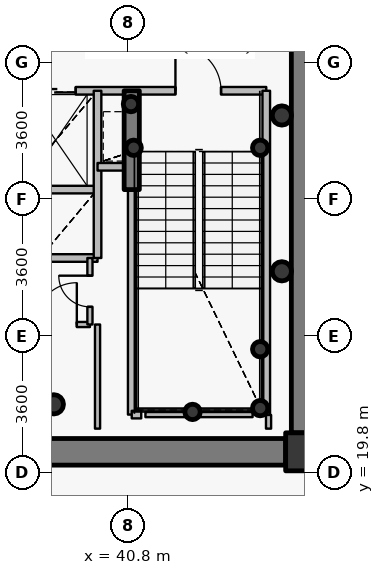
"""IFC4 building model, lengths in metres.
Left out: names, types, materials, properties, quantities, classifications, styles, units other than length and angle.
Written with IfcOpenShell. Run it as: python <this file> out.ifc"""

import sys

from ifc_helpers import new_model, si_unit, direction, frame, frame_2d, origin, origin_2d, place, context, subcontext, project, spatial, rectangle, hollow_circle, extrude, source, transform, mapped, element, fill, save


model = new_model("IFC4")
c1 = context("Model", 3, precision=1e-05, world=origin(), true_north=direction((0.0, 1.0)))
c2 = subcontext(c1, "Body", "Model", "MODEL_VIEW")
j1 = project(units=[si_unit("LENGTHUNIT", "METRE"), si_unit("PLANEANGLEUNIT", "RADIAN")], contexts=[c1])
p1 = place(None, origin())
s1 = spatial("IfcSite", under=j1, at=p1, CompositionType="ELEMENT")
p2 = place(p1, origin())
s2 = spatial("IfcBuilding", under=s1, at=p2, CompositionType="ELEMENT")
p3 = place(p2, frame((0.0, 0.0, 214.05)))
s3 = spatial("IfcBuildingStorey", under=s2, at=p3, CompositionType="ELEMENT", Elevation=214.05)
p4 = place(p3, frame((45.45, 20.35, 0.0), z_axis=(0.0, 0.0, 1.0), x_axis=(1.0, 0.0, 0.0)))
e1 = element("IfcColumn", 1, at=p4, inside=s3, PredefinedType="COLUMN", context=c2, shape_type="SweptSolid", body=[
    extrude(rectangle(XDim=1.0, YDim=1.0, at=origin_2d()), origin(), (0.0, 0.0, 1.0), 3.75),
])
p5 = place(p3, frame((38.85, 21.6, 0.0), z_axis=(0.0, 0.0, 1.0), x_axis=(1.0, 0.0, 0.0)))
e2 = element("IfcColumn", 2, at=p5, inside=s3, PredefinedType="COLUMN", context=c2, shape_type="SweptSolid", body=[
    extrude(hollow_circle(Radius=0.254, WallThickness=0.02, at=origin_2d()), origin(), (0.0, 0.0, 1.0), 3.75),
])
for number, where, z_axis, x_axis in (
    (3, (44.28, 21.5, 0.0), (0.0, 0.0, 1.0), (1.0, 0.0, 0.0)),
    (4, (44.28, 23.05, 0.0), (0.0, 0.0, 1.0), (1.0, 0.0, 0.0)),
    (5, (42.5, 21.4, 0.0), (0.0, 0.0, 1.0), (1.0, 0.0, 0.0)),
    (6, (40.95, 28.35, 0.0), (0.0, 0.0, 1.0), (1.0, 0.0, 0.0)),
    (7, (44.28, 28.35, 0.0), (0.0, 0.0, 1.0), (1.0, 0.0, 0.0)),
    (8, (40.88, 29.5, 0.0), (0.0, 0.0, 1.0), (1.0, 0.0, 0.0)),
):
    element("IfcColumn", number, at=place(p3, frame(where, z_axis=z_axis, x_axis=x_axis)), inside=s3, PredefinedType="COLUMN", context=c2, shape_type="SweptSolid", body=[
        extrude(hollow_circle(Radius=0.203, WallThickness=0.016, at=origin_2d()), origin(), (0.0, 0.0, 1.0), 3.75),
    ])
p6 = place(p3, frame((45.45, 33.15, 0.0), z_axis=(0.0, 0.0, 1.0), x_axis=(0.0, -1.0, 0.0)))
e9 = element("IfcWall", 9, at=p6, inside=s3, PredefinedType="SHEAR", context=c2, shape_type="SweptSolid", body=[
    extrude(rectangle(XDim=12.3, YDim=0.7, at=frame_2d((6.15, 0.0))), origin(), (0.0, 0.0, 1.0), 3.05),
])
p7 = place(p3, frame((44.95, 20.35, 0.0), z_axis=(0.0, 0.0, 1.0), x_axis=(-1.0, 0.0, 0.0)))
e10 = element("IfcWall", 10, at=p7, inside=s3, PredefinedType="SHEAR", context=c2, shape_type="SweptSolid", body=[
    extrude(rectangle(XDim=17.9, YDim=0.7, at=frame_2d((8.95, 0.0))), origin(), (0.0, 0.0, 1.0), 3.05),
])
p8 = place(p7, frame((9.7, 0.0, 0.0)))
e11 = element("IfcOpeningElement", 11, at=p8, cuts=e10, PredefinedType="OPENING", context=c2, shape_type="SweptSolid", body=[
    extrude(rectangle(XDim=1.15, YDim=2.15, at=origin_2d()), frame((0.575, 0.36, 1.075), z_axis=(0.0, -1.0, 0.0), x_axis=(1.0, 0.0, 0.0)), (0.0, 0.0, 1.0), 0.72),
])
p9 = place(p3, frame((40.9, 27.25, 0.0), z_axis=(0.0, 0.0, 1.0), x_axis=(0.0, 1.0, 0.0)))
e12 = element("IfcWall", 12, at=p9, inside=s3, PredefinedType="SHEAR", context=c2, shape_type="SweptSolid", body=[
    extrude(rectangle(XDim=2.6, YDim=0.4, at=frame_2d((1.3, 0.0))), origin(), (0.0, 0.0, 1.0), 3.1),
])
for number, where, z_axis, x_axis in (
    (13, (44.85, 25.1, 0.0), (0.0, 0.0, 1.0), (1.0, 0.0, 0.0)),
    (14, (44.85, 29.2, 0.0), (0.0, 0.0, 1.0), (1.0, 0.0, 0.0)),
):
    element("IfcColumn", number, at=place(p3, frame(where, z_axis=z_axis, x_axis=x_axis)), inside=s3, PredefinedType="COLUMN", context=c2, shape_type="SweptSolid", body=[
        extrude(hollow_circle(Radius=0.254, WallThickness=0.02, at=origin_2d()), origin(), (0.0, 0.0, 1.0), 3.75),
    ])
p10 = place(p3, frame((35.05, 27.25, 0.0), z_axis=(0.0, 0.0, 1.0), x_axis=(1.0, 0.0, 0.0)))
e15 = element("IfcWall", 15, at=p10, inside=s3, PredefinedType="PARTITIONING", context=c2, shape_type="SweptSolid", body=[
    extrude(rectangle(XDim=4.95, YDim=0.2, at=frame_2d((2.475, 0.0))), origin(), (0.0, 0.0, 1.0), 3.085),
])
p11 = place(p3, frame((35.45, 23.7, 0.0), z_axis=(0.0, 0.0, 1.0), x_axis=(1.0, 0.0, 0.0)))
e16 = element("IfcWall", 16, at=p11, inside=s3, PredefinedType="PARTITIONING", context=c2, shape_type="SweptSolid", body=[
    extrude(rectangle(XDim=4.35, YDim=0.135, at=frame_2d((2.175, 0.0))), origin(), (0.0, 0.0, 1.0), 3.085),
])
p12 = place(p11, frame((2.905, 0.0, 0.0)))
e17 = element("IfcOpeningElement", 17, at=p12, cuts=e16, PredefinedType="OPENING", context=c2, shape_type="SweptSolid", body=[
    extrude(rectangle(XDim=1.1, YDim=2.15, at=origin_2d()), frame((0.55, 0.078, 1.075), z_axis=(0.0, -1.0, 0.0), x_axis=(1.0, 0.0, 0.0)), (0.0, 0.0, 1.0), 0.155),
])
p13 = place(p3, frame((35.45, 25.45, 0.0), z_axis=(0.0, 0.0, 1.0), x_axis=(1.0, 0.0, 0.0)))
e18 = element("IfcWall", 18, at=p13, inside=s3, PredefinedType="PARTITIONING", context=c2, shape_type="SweptSolid", body=[
    extrude(rectangle(XDim=4.55, YDim=0.2, at=frame_2d((2.275, 0.0))), origin(), (0.0, 0.0, 1.0), 3.085),
])
p14 = place(p3, frame((35.95, 29.85, 0.0), z_axis=(0.0, 0.0, 1.0), x_axis=(1.0, 0.0, 0.0)))
e19 = element("IfcWall", 19, at=p14, inside=s3, PredefinedType="PARTITIONING", context=c2, shape_type="SweptSolid", body=[
    extrude(rectangle(XDim=8.49, YDim=0.2, at=frame_2d((4.245, 0.0))), origin(), (0.0, 0.0, 1.0), 3.085),
])
p15 = place(p14, frame((6.1, 0.0, 0.0)))
e20 = element("IfcOpeningElement", 20, at=p15, cuts=e19, PredefinedType="OPENING", context=c2, shape_type="SweptSolid", body=[
    extrude(rectangle(XDim=1.2, YDim=2.15, at=origin_2d()), frame((0.6, 0.11, 1.075), z_axis=(0.0, -1.0, 0.0), x_axis=(1.0, 0.0, 0.0)), (0.0, 0.0, 1.0), 0.22),
])
p16 = place(p14, frame((0.37, 0.0, 0.0)))
e21 = element("IfcOpeningElement", 21, at=p16, cuts=e19, PredefinedType="OPENING", context=c2, shape_type="SweptSolid", body=[
    extrude(rectangle(XDim=1.15, YDim=2.15, at=origin_2d()), frame((0.575, 0.11, 1.075), z_axis=(0.0, -1.0, 0.0), x_axis=(1.0, 0.0, 0.0)), (0.0, 0.0, 1.0), 0.22),
])
p17 = place(p14, frame((2.425, 0.0, 0.0)))
e22 = element("IfcOpeningElement", 22, at=p17, cuts=e19, PredefinedType="OPENING", context=c2, shape_type="SweptSolid", body=[
    extrude(rectangle(XDim=1.05, YDim=2.15, at=origin_2d()), frame((0.525, 0.11, 1.075), z_axis=(0.0, -1.0, 0.0), x_axis=(1.0, 0.0, 0.0)), (0.0, 0.0, 1.0), 0.22),
])
p18 = place(p3, frame((39.8, 23.7, 0.0), z_axis=(0.0, 0.0, 1.0), x_axis=(0.0, 1.0, 0.0)))
e23 = element("IfcWall", 23, at=p18, inside=s3, PredefinedType="PARTITIONING", context=c2, shape_type="SweptSolid", body=[
    extrude(rectangle(XDim=1.75, YDim=0.135, at=frame_2d((0.875, 0.0))), origin(), (0.0, 0.0, 1.0), 3.5),
])
p19 = place(p18, frame((0.465, 0.0, 0.0)))
e24 = element("IfcOpeningElement", 24, at=p19, cuts=e23, PredefinedType="OPENING", context=c2, shape_type="SweptSolid", body=[
    extrude(rectangle(XDim=0.82, YDim=2.1, at=origin_2d()), frame((0.41, 0.078, 1.05), z_axis=(0.0, -1.0, 0.0), x_axis=(1.0, 0.0, 0.0)), (0.0, 0.0, 1.0), 0.155),
])
p20 = place(p3, frame((40.0, 25.45, 0.0), z_axis=(0.0, 0.0, 1.0), x_axis=(0.0, 1.0, 0.0)))
e25 = element("IfcWall", 25, at=p20, inside=s3, PredefinedType="PARTITIONING", context=c2, shape_type="SweptSolid", body=[
    extrude(rectangle(XDim=4.4, YDim=0.2, at=frame_2d((2.2, 0.0))), origin(), (0.0, 0.0, 1.0), 3.5),
])
p21 = place(p3, frame((40.0, 27.85, 0.0), z_axis=(0.0, 0.0, 1.0), x_axis=(1.0, 0.0, 0.0)))
e26 = element("IfcWall", 26, at=p21, inside=s3, PredefinedType="PARTITIONING", context=c2, shape_type="SweptSolid", body=[
    extrude(rectangle(XDim=0.9, YDim=0.2, at=frame_2d((0.45, 0.0))), origin(), (0.0, 0.0, 1.0), 3.5),
])
p22 = place(p3, frame((40.9, 21.33, 0.0), z_axis=(0.0, 0.0, 1.0), x_axis=(0.0, 1.0, 0.0)))
e27 = element("IfcWall", 27, at=p22, inside=s3, PredefinedType="PARTITIONING", context=c2, shape_type="SweptSolid", body=[
    extrude(rectangle(XDim=5.91, YDim=0.2, at=frame_2d((2.955, 0.0))), origin(), (0.0, 0.0, 1.0), 3.035),
])
p23 = place(p3, frame((40.9, 21.33, 0.0), z_axis=(0.0, 0.0, 1.0), x_axis=(1.0, 0.0, 0.0)))
e28 = element("IfcWall", 28, at=p23, inside=s3, PredefinedType="PARTITIONING", context=c2, shape_type="SweptSolid", body=[
    extrude(rectangle(XDim=0.25, YDim=0.2, at=frame_2d((0.125, 0.0))), origin(), (0.0, 0.0, 1.0), 3.035),
])
p24 = place(p3, frame((44.44, 21.33, 0.0), z_axis=(0.0, 0.0, 1.0), x_axis=(0.0, 1.0, 0.0)))
e29 = element("IfcWall", 29, at=p24, inside=s3, PredefinedType="PARTITIONING", context=c2, shape_type="SweptSolid", body=[
    extrude(rectangle(XDim=8.52, YDim=0.2, at=frame_2d((4.26, 0.0))), origin(), (0.0, 0.0, 1.0), 3.5),
])
p25 = place(p3, frame((44.08, 21.33, 0.0), z_axis=(0.0, 0.0, 1.0), x_axis=(-1.0, 0.0, 0.0)))
e30 = element("IfcWall", 30, at=p25, inside=s3, PredefinedType="PARTITIONING", context=c2, shape_type="SweptSolid", body=[
    extrude(rectangle(XDim=2.82, YDim=0.135, at=frame_2d((1.41, 0.0))), origin(), (0.0, 0.0, 1.0), 3.035),
])
p26 = place(p3, frame((40.0, 23.7, 0.0), z_axis=(0.0, 0.0, 1.0), x_axis=(0.0, -1.0, 0.0)))
e31 = element("IfcWall", 31, at=p26, inside=s3, PredefinedType="PARTITIONING", context=c2, shape_type="SweptSolid", body=[
    extrude(rectangle(XDim=2.74, YDim=0.135, at=frame_2d((1.37, 0.0))), origin(), (0.0, 0.0, 1.0), 3.035),
])
p27 = place(p3, frame((44.5, 20.96, 0.0), z_axis=(0.0, 0.0, 1.0), x_axis=(0.0, 1.0, 0.0)))
e32 = element("IfcWall", 32, at=p27, inside=s3, PredefinedType="PARTITIONING", context=c2, shape_type="SweptSolid", body=[
    extrude(rectangle(XDim=0.36, YDim=0.135, at=frame_2d((0.18, 0.0))), origin(), (0.0, 0.0, 1.0), 3.5),
])
p28 = place(p3, frame((44.96, 20.0, 0.0), z_axis=(0.0, 0.0, 1.0), x_axis=(1.0, 0.0, 0.0)))
e33 = element("IfcWall", 33, at=p28, inside=s3, PredefinedType="PARTITIONING", context=c2, shape_type="SweptSolid", body=[
    extrude(rectangle(XDim=0.83, YDim=0.135, at=frame_2d((0.415, 0.0))), origin(), (0.0, 0.0, 1.0), 2.935),
])
m1 = source(origin(), c2, "Body", "SweptSolid", [
    extrude(rectangle(XDim=1.2, YDim=2.15, at=origin_2d()), frame((0.6, 0.025, 1.075), z_axis=(0.0, -1.0, 0.0), x_axis=(1.0, 0.0, 0.0)), (0.0, 0.0, 1.0), 0.05),
])
p29 = place(p15, origin())
e34 = element("IfcDoor", 34, at=p29, inside=s3, OperationType="SINGLE_SWING_LEFT", PredefinedType="DOOR", context=c2, shape_type="MappedRepresentation", body=[
    mapped(m1, transform((0.0, 0.0, 0.0), x_axis=(1.0, 0.0, 0.0), y_axis=(0.0, 1.0, 0.0), z_axis=(0.0, 0.0, 1.0), scale=1.0)),
])
fill(e20, e34)
m2 = source(origin(), c2, "Body", "SweptSolid", [
    extrude(rectangle(XDim=1.05, YDim=2.15, at=origin_2d()), frame((0.525, 0.025, 1.075), z_axis=(0.0, -1.0, 0.0), x_axis=(1.0, 0.0, 0.0)), (0.0, 0.0, 1.0), 0.05),
])
p30 = place(p17, origin())
e35 = element("IfcDoor", 35, at=p30, inside=s3, OperationType="DOUBLE_DOOR_SLIDING", PredefinedType="USERDEFINED", context=c2, shape_type="MappedRepresentation", body=[
    mapped(m2, transform((0.0, 0.0, 0.0), x_axis=(1.0, 0.0, 0.0), y_axis=(0.0, 1.0, 0.0), z_axis=(0.0, 0.0, 1.0), scale=1.0)),
])
fill(e22, e35)
m3 = source(origin(), c2, "Body", "SweptSolid", [
    extrude(rectangle(XDim=1.1, YDim=2.15, at=origin_2d()), frame((0.55, 0.025, 1.075), z_axis=(0.0, -1.0, 0.0), x_axis=(1.0, 0.0, 0.0)), (0.0, 0.0, 1.0), 0.05),
])
p31 = place(p12, origin())
e36 = element("IfcDoor", 36, at=p31, inside=s3, OperationType="SINGLE_SWING_RIGHT", PredefinedType="DOOR", context=c2, shape_type="MappedRepresentation", body=[
    mapped(m3, transform((0.0, 0.0, 0.0), x_axis=(1.0, 0.0, 0.0), y_axis=(0.0, 1.0, 0.0), z_axis=(0.0, 0.0, 1.0), scale=1.0)),
])
fill(e17, e36)
m4 = source(origin(), c2, "Body", "SweptSolid", [
    extrude(rectangle(XDim=0.82, YDim=2.1, at=origin_2d()), frame((0.41, 0.025, 1.05), z_axis=(0.0, -1.0, 0.0), x_axis=(1.0, 0.0, 0.0)), (0.0, 0.0, 1.0), 0.05),
])
p32 = place(p19, origin())
e37 = element("IfcDoor", 37, at=p32, inside=s3, OperationType="SINGLE_SWING_RIGHT", PredefinedType="DOOR", context=c2, shape_type="MappedRepresentation", body=[
    mapped(m4, transform((0.0, 0.0, 0.0), x_axis=(1.0, 0.0, 0.0), y_axis=(0.0, 1.0, 0.0), z_axis=(0.0, 0.0, 1.0), scale=1.0)),
])
fill(e24, e37)
save(model, sys.argv[1])
